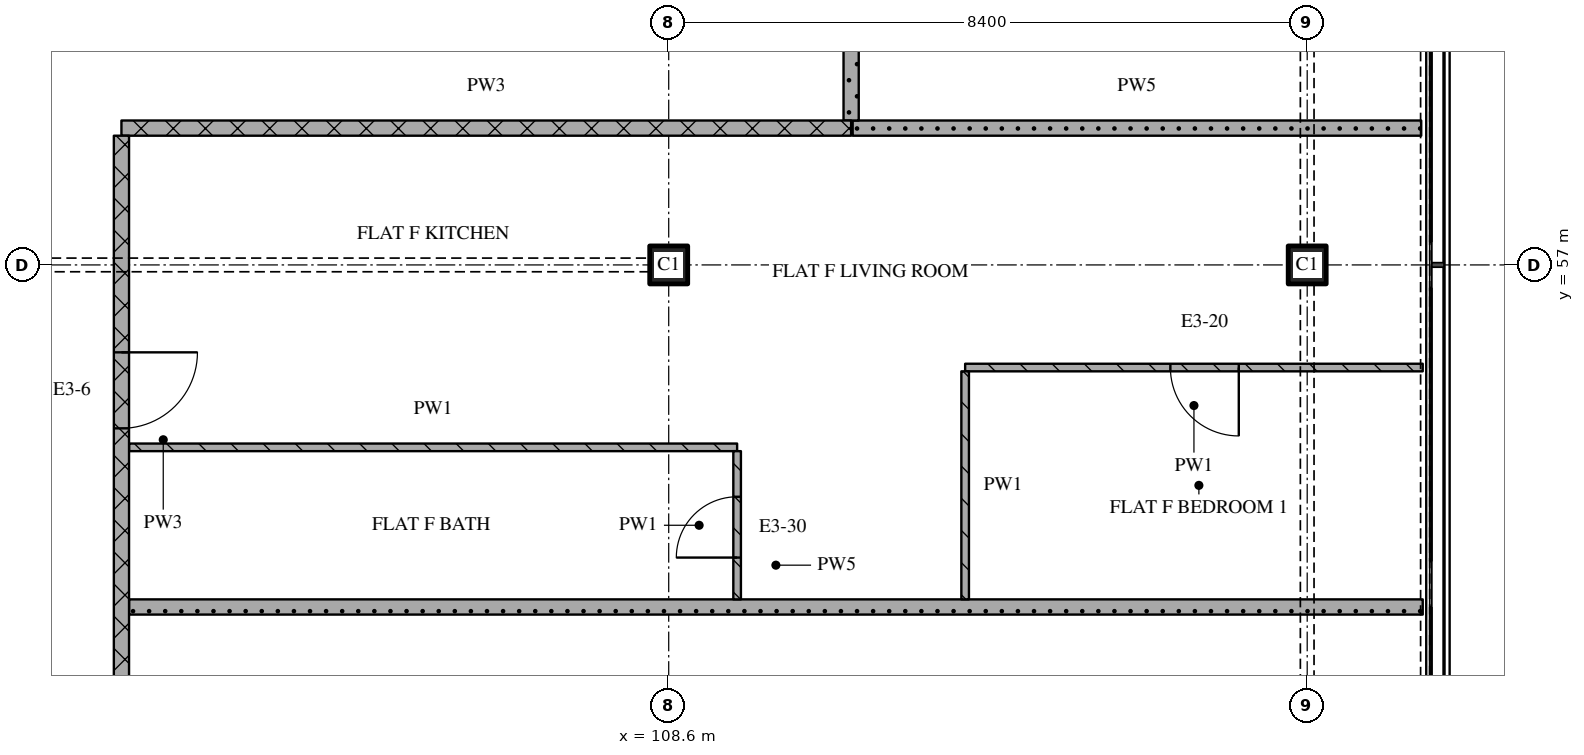
"""IFC4 building model, lengths in metres.
Left out: names, types, materials, properties, quantities, classifications, styles, units other than length and angle.
Written with IfcOpenShell. Run it as: python <this file> out.ifc"""

import sys

from ifc_helpers import new_model, si_unit, direction, frame, frame_2d, origin, origin_2d, place, context, subcontext, project, spatial, rectangle, extrude, element, fill, save


model = new_model("IFC4")
c1 = context("Model", 3, precision=1e-05, world=origin(), true_north=direction((0.0, 1.0)))
c2 = subcontext(c1, "Body", "Model", "MODEL_VIEW")
j1 = project(units=[si_unit("LENGTHUNIT", "METRE"), si_unit("PLANEANGLEUNIT", "RADIAN")], contexts=[c1])
p1 = place(None, origin())
s1 = spatial("IfcSite", under=j1, at=p1, CompositionType="ELEMENT")
p2 = place(p1, origin())
s2 = spatial("IfcBuilding", under=s1, at=p2, CompositionType="ELEMENT")
p3 = place(p2, frame((0.0, 0.0, 281.55)))
s3 = spatial("IfcBuildingStorey", under=s2, at=p3, CompositionType="ELEMENT", Elevation=281.55)
for number, where, z_axis, x_axis in (
    (1, (108.6, 57.0, 0.0), (0.0, 0.0, 1.0), (1.0, 0.0, 0.0)),
    (2, (117.0, 57.0, 0.0), (0.0, 0.0, 1.0), (1.0, 0.0, 0.0)),
):
    element("IfcColumn", number, at=place(p3, frame(where, z_axis=z_axis, x_axis=x_axis)), inside=s3, PredefinedType="COLUMN", context=c2, shape_type="SweptSolid", body=[
        extrude(rectangle(XDim=0.5, YDim=0.5, at=origin_2d()), origin(), (0.0, 0.0, 1.0), 3.6),
    ])
p4 = place(p3, frame((101.5, 52.5, 0.0), z_axis=(0.0, 0.0, 1.0), x_axis=(1.0, 0.0, 0.0)))
e3 = element("IfcWall", 3, at=p4, inside=s3, PredefinedType="PARTITIONING", context=c2, shape_type="SweptSolid", body=[
    extrude(rectangle(XDim=17.02, YDim=0.2, at=frame_2d((8.51, 0.0))), origin(), (0.0, 0.0, 1.0), 3.32),
])
p5 = place(p3, frame((101.5, 54.6, 0.0), z_axis=(0.0, 0.0, 1.0), x_axis=(1.0, 0.0, 0.0)))
e4 = element("IfcWall", 4, at=p5, inside=s3, PredefinedType="PARTITIONING", context=c2, shape_type="SweptSolid", body=[
    extrude(rectangle(XDim=8.0, YDim=0.1, at=frame_2d((4.0, 0.0))), origin(), (0.0, 0.0, 1.0), 3.32),
])
p6 = place(p3, frame((118.52, 55.65, 0.0), z_axis=(0.0, 0.0, 1.0), x_axis=(-1.0, 0.0, 0.0)))
e5 = element("IfcWall", 5, at=p6, inside=s3, PredefinedType="PARTITIONING", context=c2, shape_type="SweptSolid", body=[
    extrude(rectangle(XDim=6.02, YDim=0.1, at=frame_2d((3.01, 0.0))), origin(), (0.0, 0.0, 1.0), 3.32),
])
p7 = place(p6, frame((2.42, 0.0, 0.0)))
e6 = element("IfcOpeningElement", 6, at=p7, cuts=e5, PredefinedType="OPENING", context=c2, shape_type="SweptSolid", body=[
    extrude(rectangle(XDim=0.9, YDim=2.1, at=frame_2d((0.45, 1.05))), frame((0.0, 0.06, 0.0), z_axis=(0.0, -1.0, 0.0), x_axis=(1.0, 0.0, 0.0)), (0.0, 0.0, 1.0), 0.12),
])
p8 = place(p3, frame((101.4, 58.8, 0.0), z_axis=(0.0, 0.0, 1.0), x_axis=(1.0, 0.0, 0.0)))
e7 = element("IfcWall", 7, at=p8, inside=s3, PredefinedType="PARTITIONING", context=c2, shape_type="SweptSolid", body=[
    extrude(rectangle(XDim=9.6, YDim=0.2, at=frame_2d((4.8, 0.0))), origin(), (0.0, 0.0, 1.0), 3.32),
])
p9 = place(p3, frame((111.02, 58.8, 0.0), z_axis=(0.0, 0.0, 1.0), x_axis=(1.0, 0.0, 0.0)))
e8 = element("IfcWall", 8, at=p9, inside=s3, PredefinedType="PARTITIONING", context=c2, shape_type="SweptSolid", body=[
    extrude(rectangle(XDim=7.48, YDim=0.2, at=frame_2d((3.74, 0.0))), origin(), (0.0, 0.0, 1.0), 3.32),
])
p10 = place(p3, frame((101.4, 58.7, 0.0), z_axis=(0.0, 0.0, 1.0), x_axis=(0.0, -1.0, 0.0)))
e9 = element("IfcWall", 9, at=p10, inside=s3, PredefinedType="PARTITIONING", context=c2, shape_type="SweptSolid", body=[
    extrude(rectangle(XDim=8.0, YDim=0.2, at=frame_2d((4.0, 0.0))), origin(), (0.0, 0.0, 1.0), 3.32),
])
p11 = place(p10, frame((2.85, 0.0, 0.0)))
e10 = element("IfcOpeningElement", 10, at=p11, cuts=e9, PredefinedType="OPENING", context=c2, shape_type="SweptSolid", body=[
    extrude(rectangle(XDim=1.0, YDim=2.1, at=frame_2d((0.5, 1.05))), frame((0.0, 0.11, 0.0), z_axis=(0.0, -1.0, 0.0), x_axis=(1.0, 0.0, 0.0)), (0.0, 0.0, 1.0), 0.22),
])
p12 = place(p3, frame((109.5, 52.6, 0.0), z_axis=(0.0, 0.0, 1.0), x_axis=(0.0, 1.0, 0.0)))
e11 = element("IfcWall", 11, at=p12, inside=s3, PredefinedType="PARTITIONING", context=c2, shape_type="SweptSolid", body=[
    extrude(rectangle(XDim=1.95, YDim=0.1, at=frame_2d((0.975, 0.0))), origin(), (0.0, 0.0, 1.0), 3.32),
])
p13 = place(p12, frame((0.55, 0.0, 0.0)))
e12 = element("IfcOpeningElement", 12, at=p13, cuts=e11, PredefinedType="OPENING", context=c2, shape_type="SweptSolid", body=[
    extrude(rectangle(XDim=0.8, YDim=2.1, at=frame_2d((0.4, 1.05))), frame((0.0, 0.06, 0.0), z_axis=(0.0, -1.0, 0.0), x_axis=(1.0, 0.0, 0.0)), (0.0, 0.0, 1.0), 0.12),
])
p14 = place(p3, frame((111.0, 61.1, 0.0), z_axis=(0.0, 0.0, 1.0), x_axis=(0.0, -1.0, 0.0)))
e13 = element("IfcWall", 13, at=p14, inside=s3, PredefinedType="PARTITIONING", context=c2, shape_type="SweptSolid", body=[
    extrude(rectangle(XDim=2.2, YDim=0.2, at=frame_2d((1.1, 0.0))), origin(), (0.0, 0.0, 1.0), 3.32),
])
p15 = place(p3, frame((112.5, 55.6, 0.0), z_axis=(0.0, 0.0, 1.0), x_axis=(0.0, -1.0, 0.0)))
e14 = element("IfcWall", 14, at=p15, inside=s3, PredefinedType="PARTITIONING", context=c2, shape_type="SweptSolid", body=[
    extrude(rectangle(XDim=3.0, YDim=0.1, at=frame_2d((1.5, 0.0))), origin(), (0.0, 0.0, 1.0), 3.32),
])
p16 = place(p7, origin())
e15 = element("IfcDoor", 15, at=p16, inside=s3, OperationType="SINGLE_SWING_LEFT", PredefinedType="DOOR", context=c2, shape_type="SweptSolid", body=[
    extrude(rectangle(XDim=0.9, YDim=2.1, at=frame_2d((0.45, 1.05))), frame((0.0, 0.025, 0.0), z_axis=(0.0, -1.0, 0.0), x_axis=(1.0, 0.0, 0.0)), (0.0, 0.0, 1.0), 0.05),
])
fill(e6, e15)
p17 = place(p11, origin())
e16 = element("IfcDoor", 16, at=p17, inside=s3, OperationType="SINGLE_SWING_LEFT", PredefinedType="DOOR", context=c2, shape_type="SweptSolid", body=[
    extrude(rectangle(XDim=1.0, YDim=2.1, at=frame_2d((0.5, 1.05))), frame((0.0, 0.025, 0.0), z_axis=(0.0, -1.0, 0.0), x_axis=(1.0, 0.0, 0.0)), (0.0, 0.0, 1.0), 0.05),
])
fill(e10, e16)
p18 = place(p13, origin())
e17 = element("IfcDoor", 17, at=p18, inside=s3, OperationType="SINGLE_SWING_LEFT", PredefinedType="DOOR", context=c2, shape_type="SweptSolid", body=[
    extrude(rectangle(XDim=0.8, YDim=2.1, at=frame_2d((0.4, 1.05))), frame((0.0, 0.025, 0.0), z_axis=(0.0, -1.0, 0.0), x_axis=(1.0, 0.0, 0.0)), (0.0, 0.0, 1.0), 0.05),
])
fill(e12, e17)
save(model, sys.argv[1])
